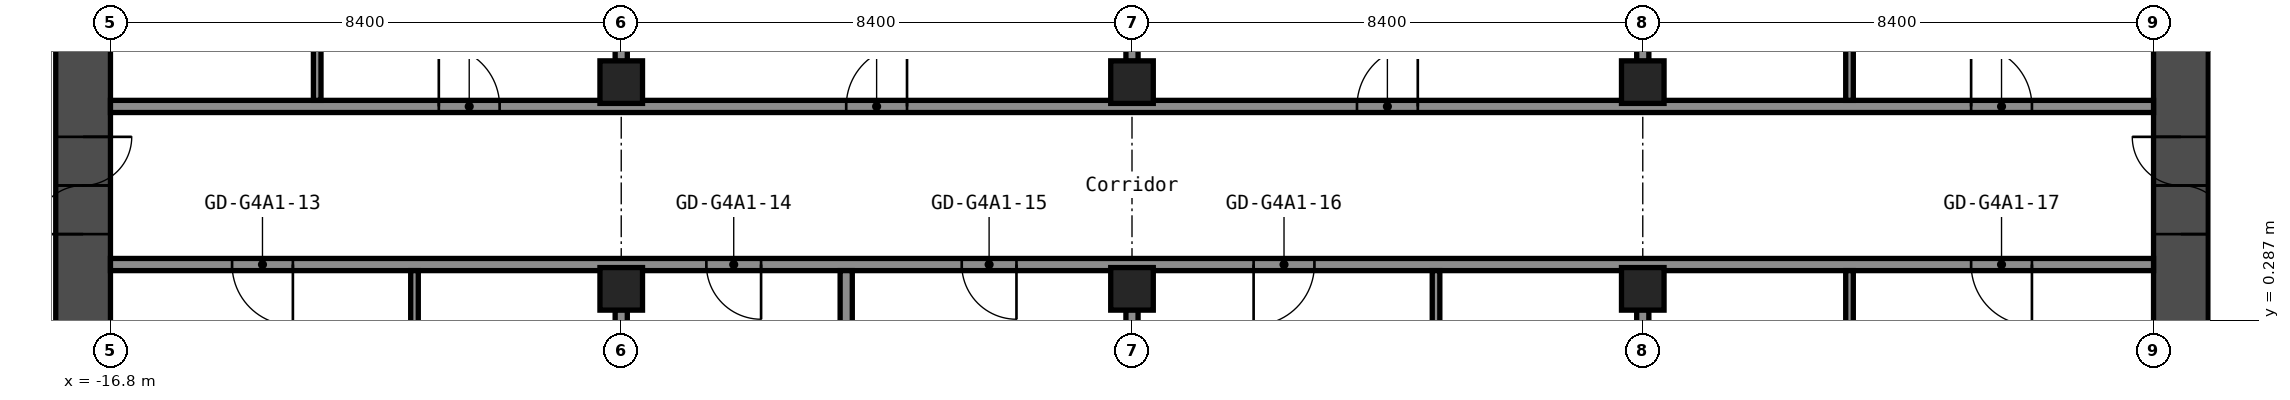
"""IFC4 building model, lengths in metres.
Left out: names, types, materials, properties, quantities, classifications, styles, units other than length and angle.
Written with IfcOpenShell. Run it as: python <this file> out.ifc"""

import sys

from ifc_helpers import new_model, si_unit, direction, frame, frame_2d, origin, origin_2d, place, context, subcontext, project, spatial, rectangle, hollow_rectangle, extrude, element, fill, save


model = new_model("IFC4")
c1 = context("Model", 3, precision=1e-05, world=origin(), true_north=direction((0.0, 1.0)))
c2 = subcontext(c1, "Body", "Model", "MODEL_VIEW")
j1 = project(units=[si_unit("LENGTHUNIT", "METRE"), si_unit("PLANEANGLEUNIT", "RADIAN")], contexts=[c1])
p1 = place(None, origin())
s1 = spatial("IfcSite", under=j1, at=p1, CompositionType="ELEMENT")
p2 = place(p1, origin())
s2 = spatial("IfcBuilding", under=s1, at=p2, CompositionType="ELEMENT")
p3 = place(p2, frame((0.0, 0.0, 202.6)))
s3 = spatial("IfcBuildingStorey", under=s2, at=p3, CompositionType="ELEMENT", Elevation=202.6)
for number, where, z_axis, x_axis in (
    (1, (-8.4, 0.8, 0.0), (0.0, 0.0, 1.0), (1.0, 0.0, 0.0)),
    (2, (-8.4, 4.2, 0.0), (0.0, 0.0, 1.0), (1.0, 0.0, 0.0)),
    (3, (0.0, 0.8, 0.0), (0.0, 0.0, 1.0), (1.0, 0.0, 0.0)),
    (4, (0.0, 4.2, 0.0), (0.0, 0.0, 1.0), (1.0, 0.0, 0.0)),
    (5, (8.4, 0.8, 0.0), (0.0, 0.0, 1.0), (1.0, 0.0, 0.0)),
    (6, (8.4, 4.2, 0.0), (0.0, 0.0, 1.0), (1.0, 0.0, 0.0)),
):
    element("IfcColumn", number, at=place(p3, frame(where, z_axis=z_axis, x_axis=x_axis)), inside=s3, PredefinedType="COLUMN", context=c2, shape_type="SweptSolid", body=[
        extrude(hollow_rectangle(XDim=0.7, YDim=0.7, WallThickness=0.028, at=origin_2d()), origin(), (0.0, 0.0, 1.0), 2.75),
    ])
p4 = place(p3, frame((-17.25, -8.4, 0.0), z_axis=(0.0, 0.0, 1.0), x_axis=(0.0, 1.0, 0.0)))
e7 = element("IfcWall", 7, at=p4, inside=s3, PredefinedType="SHEAR", context=c2, shape_type="SweptSolid", body=[
    extrude(rectangle(XDim=16.8, YDim=0.9, at=frame_2d((8.4, 0.0))), origin(), (0.0, 0.0, 1.0), 2.75),
])
p5 = place(p4, frame((10.1, 0.0, 0.0)))
e8 = element("IfcOpeningElement", 8, at=p5, cuts=e7, PredefinedType="OPENING", context=c2, shape_type="SweptSolid", body=[
    extrude(rectangle(XDim=1.6, YDim=2.1, at=frame_2d((0.8, 1.05))), frame((0.0, 0.46, 0.0), z_axis=(0.0, -1.0, 0.0), x_axis=(1.0, 0.0, 0.0)), (0.0, 0.0, 1.0), 0.92),
])
p6 = place(p3, frame((17.25, -8.4, 0.0), z_axis=(0.0, 0.0, 1.0), x_axis=(0.0, 1.0, 0.0)))
e9 = element("IfcWall", 9, at=p6, inside=s3, PredefinedType="SHEAR", context=c2, shape_type="SweptSolid", body=[
    extrude(rectangle(XDim=16.8, YDim=0.9, at=frame_2d((8.4, 0.0))), origin(), (0.0, 0.0, 1.0), 2.75),
])
p7 = place(p6, frame((10.1, 0.0, 0.0)))
e10 = element("IfcOpeningElement", 10, at=p7, cuts=e9, PredefinedType="OPENING", context=c2, shape_type="SweptSolid", body=[
    extrude(rectangle(XDim=1.6, YDim=2.1, at=frame_2d((0.8, 1.05))), frame((0.0, 0.46, 0.0), z_axis=(0.0, -1.0, 0.0), x_axis=(1.0, 0.0, 0.0)), (0.0, 0.0, 1.0), 0.92),
])
p8 = place(p3, frame((-16.8, 1.2, 0.0), z_axis=(0.0, 0.0, 1.0), x_axis=(1.0, 0.0, 0.0)))
e11 = element("IfcWall", 11, at=p8, inside=s3, PredefinedType="PARTITIONING", context=c2, shape_type="SweptSolid", body=[
    extrude(rectangle(XDim=33.6, YDim=0.2, at=frame_2d((16.8, 0.0))), origin(), (0.0, 0.0, 1.0), 2.75),
])
p9 = place(p8, frame((2.0, 0.0, 0.0)))
e12 = element("IfcOpeningElement", 12, at=p9, cuts=e11, PredefinedType="OPENING", context=c2, shape_type="SweptSolid", body=[
    extrude(rectangle(XDim=1.0, YDim=2.1, at=frame_2d((0.5, 1.05))), frame((0.0, 0.11, 0.0), z_axis=(0.0, -1.0, 0.0), x_axis=(1.0, 0.0, 0.0)), (0.0, 0.0, 1.0), 0.22),
])
p10 = place(p8, frame((9.8, 0.0, 0.0)))
e13 = element("IfcOpeningElement", 13, at=p10, cuts=e11, PredefinedType="OPENING", context=c2, shape_type="SweptSolid", body=[
    extrude(rectangle(XDim=0.9, YDim=2.1, at=frame_2d((0.45, 1.05))), frame((0.0, 0.11, 0.0), z_axis=(0.0, -1.0, 0.0), x_axis=(1.0, 0.0, 0.0)), (0.0, 0.0, 1.0), 0.22),
])
p11 = place(p8, frame((14.0, 0.0, 0.0)))
e14 = element("IfcOpeningElement", 14, at=p11, cuts=e11, PredefinedType="OPENING", context=c2, shape_type="SweptSolid", body=[
    extrude(rectangle(XDim=0.9, YDim=2.1, at=frame_2d((0.45, 1.05))), frame((0.0, 0.11, 0.0), z_axis=(0.0, -1.0, 0.0), x_axis=(1.0, 0.0, 0.0)), (0.0, 0.0, 1.0), 0.22),
])
p12 = place(p8, frame((18.8, 0.0, 0.0)))
e15 = element("IfcOpeningElement", 15, at=p12, cuts=e11, PredefinedType="OPENING", context=c2, shape_type="SweptSolid", body=[
    extrude(rectangle(XDim=1.0, YDim=2.1, at=frame_2d((0.5, 1.05))), frame((0.0, 0.11, 0.0), z_axis=(0.0, -1.0, 0.0), x_axis=(1.0, 0.0, 0.0)), (0.0, 0.0, 1.0), 0.22),
])
p13 = place(p8, frame((30.6, 0.0, 0.0)))
e16 = element("IfcOpeningElement", 16, at=p13, cuts=e11, PredefinedType="OPENING", context=c2, shape_type="SweptSolid", body=[
    extrude(rectangle(XDim=1.0, YDim=2.1, at=frame_2d((0.5, 1.05))), frame((0.0, 0.11, 0.0), z_axis=(0.0, -1.0, 0.0), x_axis=(1.0, 0.0, 0.0)), (0.0, 0.0, 1.0), 0.22),
])
p14 = place(p3, frame((-16.8, 3.8, 0.0), z_axis=(0.0, 0.0, 1.0), x_axis=(1.0, 0.0, 0.0)))
e17 = element("IfcWall", 17, at=p14, inside=s3, PredefinedType="PARTITIONING", context=c2, shape_type="SweptSolid", body=[
    extrude(rectangle(XDim=33.6, YDim=0.2, at=frame_2d((16.8, 0.0))), origin(), (0.0, 0.0, 1.0), 2.75),
])
p15 = place(p14, frame((5.4, 0.0, 0.0)))
e18 = element("IfcOpeningElement", 18, at=p15, cuts=e17, PredefinedType="OPENING", context=c2, shape_type="SweptSolid", body=[
    extrude(rectangle(XDim=1.0, YDim=2.1, at=frame_2d((0.5, 1.05))), frame((0.0, 0.11, 0.0), z_axis=(0.0, -1.0, 0.0), x_axis=(1.0, 0.0, 0.0)), (0.0, 0.0, 1.0), 0.22),
])
p16 = place(p14, frame((12.1, 0.0, 0.0)))
e19 = element("IfcOpeningElement", 19, at=p16, cuts=e17, PredefinedType="OPENING", context=c2, shape_type="SweptSolid", body=[
    extrude(rectangle(XDim=1.0, YDim=2.1, at=frame_2d((0.5, 1.05))), frame((0.0, 0.11, 0.0), z_axis=(0.0, -1.0, 0.0), x_axis=(1.0, 0.0, 0.0)), (0.0, 0.0, 1.0), 0.22),
])
p17 = place(p14, frame((20.5, 0.0, 0.0)))
e20 = element("IfcOpeningElement", 20, at=p17, cuts=e17, PredefinedType="OPENING", context=c2, shape_type="SweptSolid", body=[
    extrude(rectangle(XDim=1.0, YDim=2.1, at=frame_2d((0.5, 1.05))), frame((0.0, 0.11, 0.0), z_axis=(0.0, -1.0, 0.0), x_axis=(1.0, 0.0, 0.0)), (0.0, 0.0, 1.0), 0.22),
])
p18 = place(p14, frame((30.6, 0.0, 0.0)))
e21 = element("IfcOpeningElement", 21, at=p18, cuts=e17, PredefinedType="OPENING", context=c2, shape_type="SweptSolid", body=[
    extrude(rectangle(XDim=1.0, YDim=2.1, at=frame_2d((0.5, 1.05))), frame((0.0, 0.11, 0.0), z_axis=(0.0, -1.0, 0.0), x_axis=(1.0, 0.0, 0.0)), (0.0, 0.0, 1.0), 0.22),
])
for number, where, z_axis, x_axis in (
    (22, (-13.4, 3.9, 0.0), (0.0, 0.0, 1.0), (0.0, 1.0, 0.0)),
    (23, (-11.8, -2.2, 0.0), (0.0, 0.0, 1.0), (0.0, 1.0, 0.0)),
):
    element("IfcWall", number, at=place(p3, frame(where, z_axis=z_axis, x_axis=x_axis)), inside=s3, PredefinedType="PARTITIONING", context=c2, shape_type="SweptSolid", body=[
        extrude(rectangle(XDim=3.3, YDim=0.125, at=frame_2d((1.65, 0.0))), origin(), (0.0, 0.0, 1.0), 2.75),
    ])
for number, where, z_axis, x_axis in (
    (24, (-8.4, -15.55, 0.0), (0.0, 0.0, 1.0), (0.0, 1.0, 0.0)),
    (25, (-8.4, 4.54, 0.0), (0.0, 0.0, 1.0), (0.0, 1.0, 0.0)),
):
    element("IfcWall", number, at=place(p3, frame(where, z_axis=z_axis, x_axis=x_axis)), inside=s3, PredefinedType="PARTITIONING", context=c2, shape_type="SweptSolid", body=[
        extrude(rectangle(XDim=16.01, YDim=0.2, at=frame_2d((8.005, 0.0))), origin(), (0.0, 0.0, 1.0), 2.75),
    ])
p19 = place(p3, frame((-4.7, -15.55, 0.0), z_axis=(0.0, 0.0, 1.0), x_axis=(0.0, 1.0, 0.0)))
e26 = element("IfcWall", 26, at=p19, inside=s3, PredefinedType="PARTITIONING", context=c2, shape_type="SweptSolid", body=[
    extrude(rectangle(XDim=16.65, YDim=0.2, at=frame_2d((8.325, 0.0))), origin(), (0.0, 0.0, 1.0), 2.75),
])
for number, where, z_axis, x_axis in (
    (27, (0.0, -15.55, 0.0), (0.0, 0.0, 1.0), (0.0, 1.0, 0.0)),
    (28, (0.0, 4.54, 0.0), (0.0, 0.0, 1.0), (0.0, 1.0, 0.0)),
):
    element("IfcWall", number, at=place(p3, frame(where, z_axis=z_axis, x_axis=x_axis)), inside=s3, PredefinedType="PARTITIONING", context=c2, shape_type="SweptSolid", body=[
        extrude(rectangle(XDim=16.01, YDim=0.2, at=frame_2d((8.005, 0.0))), origin(), (0.0, 0.0, 1.0), 2.75),
    ])
p20 = place(p3, frame((5.0, -2.2, 0.0), z_axis=(0.0, 0.0, 1.0), x_axis=(0.0, 1.0, 0.0)))
e29 = element("IfcWall", 29, at=p20, inside=s3, PredefinedType="PARTITIONING", context=c2, shape_type="SweptSolid", body=[
    extrude(rectangle(XDim=3.3, YDim=0.125, at=frame_2d((1.65, 0.0))), origin(), (0.0, 0.0, 1.0), 2.75),
])
for number, where, z_axis, x_axis in (
    (30, (8.4, -15.55, 0.0), (0.0, 0.0, 1.0), (0.0, 1.0, 0.0)),
    (31, (8.4, 4.54, 0.0), (0.0, 0.0, 1.0), (0.0, 1.0, 0.0)),
):
    element("IfcWall", number, at=place(p3, frame(where, z_axis=z_axis, x_axis=x_axis)), inside=s3, PredefinedType="PARTITIONING", context=c2, shape_type="SweptSolid", body=[
        extrude(rectangle(XDim=16.01, YDim=0.2, at=frame_2d((8.005, 0.0))), origin(), (0.0, 0.0, 1.0), 2.75),
    ])
for number, where, z_axis, x_axis in (
    (32, (11.8, -2.2, 0.0), (0.0, 0.0, 1.0), (0.0, 1.0, 0.0)),
    (33, (11.8, 3.9, 0.0), (0.0, 0.0, 1.0), (0.0, 1.0, 0.0)),
):
    element("IfcWall", number, at=place(p3, frame(where, z_axis=z_axis, x_axis=x_axis)), inside=s3, PredefinedType="PARTITIONING", context=c2, shape_type="SweptSolid", body=[
        extrude(rectangle(XDim=3.3, YDim=0.125, at=frame_2d((1.65, 0.0))), origin(), (0.0, 0.0, 1.0), 2.75),
    ])
p21 = place(p5, origin())
e34 = element("IfcDoor", 34, at=p21, inside=s3, OperationType="DOUBLE_DOOR_SINGLE_SWING", PredefinedType="DOOR", context=c2, shape_type="SweptSolid", body=[
    extrude(rectangle(XDim=1.6, YDim=2.1, at=frame_2d((0.8, 1.05))), frame((0.0, 0.025, 0.0), z_axis=(0.0, -1.0, 0.0), x_axis=(1.0, 0.0, 0.0)), (0.0, 0.0, 1.0), 0.05),
])
fill(e8, e34)
p22 = place(p7, origin())
e35 = element("IfcDoor", 35, at=p22, inside=s3, OperationType="DOUBLE_DOOR_SINGLE_SWING", PredefinedType="DOOR", context=c2, shape_type="SweptSolid", body=[
    extrude(rectangle(XDim=1.6, YDim=2.1, at=frame_2d((0.8, 1.05))), frame((0.0, 0.025, 0.0), z_axis=(0.0, -1.0, 0.0), x_axis=(1.0, 0.0, 0.0)), (0.0, 0.0, 1.0), 0.05),
])
fill(e10, e35)
p23 = place(p9, origin())
e36 = element("IfcDoor", 36, at=p23, inside=s3, OperationType="SINGLE_SWING_RIGHT", PredefinedType="DOOR", context=c2, shape_type="SweptSolid", body=[
    extrude(rectangle(XDim=1.0, YDim=2.1, at=frame_2d((0.5, 1.05))), frame((0.0, 0.025, 0.0), z_axis=(0.0, -1.0, 0.0), x_axis=(1.0, 0.0, 0.0)), (0.0, 0.0, 1.0), 0.05),
])
fill(e12, e36)
p24 = place(p10, origin())
e37 = element("IfcDoor", 37, at=p24, inside=s3, OperationType="SINGLE_SWING_RIGHT", PredefinedType="DOOR", context=c2, shape_type="SweptSolid", body=[
    extrude(rectangle(XDim=0.9, YDim=2.1, at=frame_2d((0.45, 1.05))), frame((0.0, 0.025, 0.0), z_axis=(0.0, -1.0, 0.0), x_axis=(1.0, 0.0, 0.0)), (0.0, 0.0, 1.0), 0.05),
])
fill(e13, e37)
p25 = place(p11, origin())
e38 = element("IfcDoor", 38, at=p25, inside=s3, OperationType="SINGLE_SWING_RIGHT", PredefinedType="DOOR", context=c2, shape_type="SweptSolid", body=[
    extrude(rectangle(XDim=0.9, YDim=2.1, at=frame_2d((0.45, 1.05))), frame((0.0, 0.025, 0.0), z_axis=(0.0, -1.0, 0.0), x_axis=(1.0, 0.0, 0.0)), (0.0, 0.0, 1.0), 0.05),
])
fill(e14, e38)
p26 = place(p12, origin())
e39 = element("IfcDoor", 39, at=p26, inside=s3, OperationType="SINGLE_SWING_LEFT", PredefinedType="DOOR", context=c2, shape_type="SweptSolid", body=[
    extrude(rectangle(XDim=1.0, YDim=2.1, at=frame_2d((0.5, 1.05))), frame((0.0, 0.025, 0.0), z_axis=(0.0, -1.0, 0.0), x_axis=(1.0, 0.0, 0.0)), (0.0, 0.0, 1.0), 0.05),
])
fill(e15, e39)
p27 = place(p13, origin())
e40 = element("IfcDoor", 40, at=p27, inside=s3, OperationType="SINGLE_SWING_RIGHT", PredefinedType="DOOR", context=c2, shape_type="SweptSolid", body=[
    extrude(rectangle(XDim=1.0, YDim=2.1, at=frame_2d((0.5, 1.05))), frame((0.0, 0.025, 0.0), z_axis=(0.0, -1.0, 0.0), x_axis=(1.0, 0.0, 0.0)), (0.0, 0.0, 1.0), 0.05),
])
fill(e16, e40)
p28 = place(p15, origin())
e41 = element("IfcDoor", 41, at=p28, inside=s3, OperationType="SINGLE_SWING_RIGHT", PredefinedType="DOOR", context=c2, shape_type="SweptSolid", body=[
    extrude(rectangle(XDim=1.0, YDim=2.1, at=frame_2d((0.5, 1.05))), frame((0.0, 0.025, 0.0), z_axis=(0.0, -1.0, 0.0), x_axis=(1.0, 0.0, 0.0)), (0.0, 0.0, 1.0), 0.05),
])
fill(e18, e41)
p29 = place(p16, origin())
e42 = element("IfcDoor", 42, at=p29, inside=s3, OperationType="SINGLE_SWING_LEFT", PredefinedType="DOOR", context=c2, shape_type="SweptSolid", body=[
    extrude(rectangle(XDim=1.0, YDim=2.1, at=frame_2d((0.5, 1.05))), frame((0.0, 0.025, 0.0), z_axis=(0.0, -1.0, 0.0), x_axis=(1.0, 0.0, 0.0)), (0.0, 0.0, 1.0), 0.05),
])
fill(e19, e42)
p30 = place(p17, origin())
e43 = element("IfcDoor", 43, at=p30, inside=s3, OperationType="SINGLE_SWING_LEFT", PredefinedType="DOOR", context=c2, shape_type="SweptSolid", body=[
    extrude(rectangle(XDim=1.0, YDim=2.1, at=frame_2d((0.5, 1.05))), frame((0.0, 0.025, 0.0), z_axis=(0.0, -1.0, 0.0), x_axis=(1.0, 0.0, 0.0)), (0.0, 0.0, 1.0), 0.05),
])
fill(e20, e43)
p31 = place(p18, origin())
e44 = element("IfcDoor", 44, at=p31, inside=s3, OperationType="SINGLE_SWING_RIGHT", PredefinedType="DOOR", context=c2, shape_type="SweptSolid", body=[
    extrude(rectangle(XDim=1.0, YDim=2.1, at=frame_2d((0.5, 1.05))), frame((0.0, 0.025, 0.0), z_axis=(0.0, -1.0, 0.0), x_axis=(1.0, 0.0, 0.0)), (0.0, 0.0, 1.0), 0.05),
])
fill(e21, e44)
save(model, sys.argv[1])
